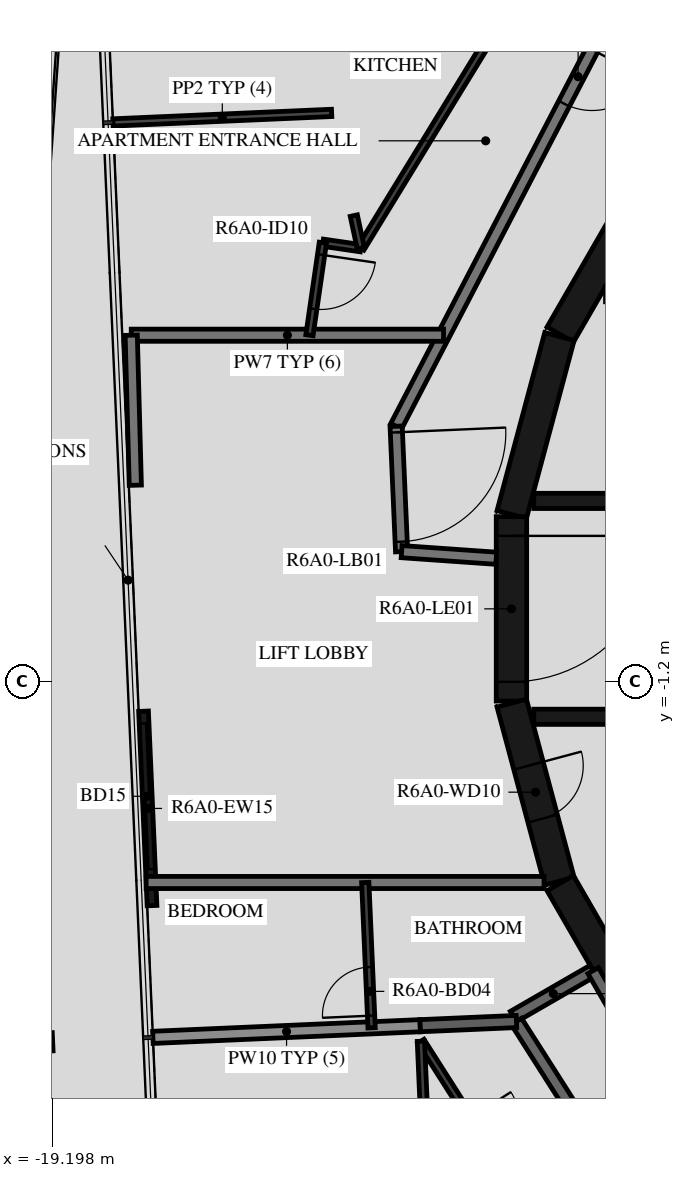
"""IFC4 building model, lengths in metres.
Left out: names, types, materials, properties, quantities, classifications, styles, units other than length and angle.
Written with IfcOpenShell. Run it as: python <this file> out.ifc"""

import sys

from ifc_helpers import new_model, si_unit, direction, frame, frame_2d, origin, origin_2d, place, context, subcontext, project, spatial, rectangle, i_section, extrude, element, fill, save


model = new_model("IFC4")
c1 = context("Model", 3, precision=1e-05, world=origin(), true_north=direction((0.0, 1.0)))
c2 = subcontext(c1, "Body", "Model", "MODEL_VIEW")
j1 = project(units=[si_unit("LENGTHUNIT", "METRE"), si_unit("PLANEANGLEUNIT", "RADIAN")], contexts=[c1])
p1 = place(None, origin())
s1 = spatial("IfcSite", under=j1, at=p1, CompositionType="ELEMENT")
p2 = place(p1, origin())
s2 = spatial("IfcBuilding", under=s1, at=p2, CompositionType="ELEMENT")
p3 = place(p2, frame((0.0, 0.0, 226.7)))
s3 = spatial("IfcBuildingStorey", under=s2, at=p3, CompositionType="ELEMENT", Elevation=226.7)
p4 = place(p3, frame((-19.642, -7.139, -0.45), z_axis=(0.0, 0.0, 1.0), x_axis=(-0.043619010384, 0.999048238041, 0.0)))
e1 = element("IfcColumn", 1, at=p4, inside=s3, PredefinedType="COLUMN", context=c2, shape_type="SweptSolid", body=[
    extrude(i_section(OverallWidth=0.3, OverallDepth=0.9, WebThickness=0.019, FlangeThickness=0.035, FilletRadius=0.03, at=origin_2d()), origin(), (0.0, 0.0, 1.0), 3.57),
])
p5 = place(p3, frame((-17.698, -1.684, 0.0), z_axis=(0.0, 0.0, 1.0), x_axis=(0.043639181999, -0.999047357133, 0.0)))
e2 = element("IfcWall", 2, at=p5, inside=s3, PredefinedType="STANDARD", context=c2, shape_type="SweptSolid", body=[
    extrude(rectangle(XDim=3.2, YDim=0.16, at=frame_2d((1.6, 0.0))), origin(), (0.0, 0.0, 1.0), 3.12),
])
p6 = place(p5, frame((0.2, 0.0, 0.0)))
e3 = element("IfcOpeningElement", 3, at=p6, cuts=e2, PredefinedType="OPENING", context=c2, shape_type="SweptSolid", body=[
    extrude(rectangle(XDim=2.4, YDim=2.4, at=frame_2d((1.2, 1.2))), frame((0.0, 0.09, 0.0), z_axis=(0.0, -1.0, 0.0), x_axis=(1.0, 0.0, 0.0)), (0.0, 0.0, 1.0), 0.18),
])
for number, where, z_axis, x_axis in (
    (4, (-9.329, 7.137, 0.0), (0.0, 0.0, 1.0), (-0.5, -0.866, 0.0)),
    (5, (-10.858, 4.479, 0.0), (0.0, 0.0, 1.0), (-0.259, -0.966, 0.0)),
):
    element("IfcWall", number, at=place(p3, frame(where, z_axis=z_axis, x_axis=x_axis)), inside=s3, PredefinedType="SHEAR", context=c2, shape_type="SweptSolid", body=[
        extrude(rectangle(XDim=3.033, YDim=0.5, at=frame_2d((1.516, 0.0))), origin(), (0.0, 0.0, 1.0), 3.12),
    ])
p7 = place(p3, frame((-11.647, 1.516, 0.0), z_axis=(0.0, 0.0, 1.0), x_axis=(0.0, -1.0, 0.0)))
e6 = element("IfcWall", 6, at=p7, inside=s3, PredefinedType="SHEAR", context=c2, shape_type="SweptSolid", body=[
    extrude(rectangle(XDim=3.033, YDim=0.5, at=frame_2d((1.516, 0.0))), origin(), (0.0, 0.0, 1.0), 3.12),
])
p8 = place(p7, frame((0.316, 0.0, 0.0)))
e7 = element("IfcOpeningElement", 7, at=p8, cuts=e6, PredefinedType="OPENING", context=c2, shape_type="SweptSolid", body=[
    extrude(rectangle(XDim=2.4, YDim=2.1, at=frame_2d((1.2, 1.05))), frame((0.0, 0.26, 0.0), z_axis=(0.0, -1.0, 0.0), x_axis=(1.0, 0.0, 0.0)), (0.0, 0.0, 1.0), 0.52),
])
p9 = place(p3, frame((-11.643, -1.55, 0.0), z_axis=(0.0, 0.0, 1.0), x_axis=(0.258734743916, -0.965948410781, 0.0)))
e8 = element("IfcWall", 8, at=p9, inside=s3, PredefinedType="SHEAR", context=c2, shape_type="SweptSolid", body=[
    extrude(rectangle(XDim=3.033, YDim=0.5, at=frame_2d((1.516, 0.0))), origin(), (0.0, 0.0, 1.0), 3.12),
])
p10 = place(p9, frame((1.066, 0.0, 0.0)))
e9 = element("IfcOpeningElement", 9, at=p10, cuts=e8, PredefinedType="OPENING", context=c2, shape_type="SweptSolid", body=[
    extrude(rectangle(XDim=0.9, YDim=2.1, at=frame_2d((0.45, 1.05))), frame((0.0, 0.26, 0.0), z_axis=(0.0, -1.0, 0.0), x_axis=(1.0, 0.0, 0.0)), (0.0, 0.0, 1.0), 0.52),
])
p11 = place(p3, frame((-10.845, -4.51, 0.0), z_axis=(0.0, 0.0, 1.0), x_axis=(0.500087131594, -0.865975092491, 0.0)))
e10 = element("IfcWall", 10, at=p11, inside=s3, PredefinedType="SHEAR", context=c2, shape_type="SweptSolid", body=[
    extrude(rectangle(XDim=3.033, YDim=0.5, at=frame_2d((1.516, 0.0))), origin(), (0.0, 0.0, 1.0), 3.12),
])
p12 = place(p3, frame((-11.28, 1.775, 0.0), z_axis=(0.0, 0.0, 1.0), x_axis=(1.0, 0.0, 0.0)))
e11 = element("IfcWall", 11, at=p12, inside=s3, PredefinedType="SHEAR", context=c2, shape_type="SweptSolid", body=[
    extrude(rectangle(XDim=14.38, YDim=0.25, at=frame_2d((7.19, 0.0))), origin(), (0.0, 0.0, 1.0), 3.12),
])
p13 = place(p12, frame((10.73, 0.0, 0.0)))
e12 = element("IfcOpeningElement", 12, at=p13, cuts=e11, PredefinedType="OPENING", context=c2, shape_type="SweptSolid", body=[
    extrude(rectangle(XDim=1.1, YDim=2.1, at=frame_2d((0.55, 1.05))), frame((0.0, 0.135, 0.0), z_axis=(0.0, -1.0, 0.0), x_axis=(1.0, 0.0, 0.0)), (0.0, 0.0, 1.0), 0.27),
])
p14 = place(p12, frame((12.88, 0.0, 0.0)))
e13 = element("IfcOpeningElement", 13, at=p14, cuts=e11, PredefinedType="OPENING", context=c2, shape_type="SweptSolid", body=[
    extrude(rectangle(XDim=1.1, YDim=2.1, at=frame_2d((0.55, 1.05))), frame((0.0, 0.135, 0.0), z_axis=(0.0, -1.0, 0.0), x_axis=(1.0, 0.0, 0.0)), (0.0, 0.0, 1.0), 0.27),
])
p15 = place(p12, frame((3.305, 0.0, 0.0)))
e14 = element("IfcOpeningElement", 14, at=p15, cuts=e11, PredefinedType="OPENING", context=c2, shape_type="SweptSolid", body=[
    extrude(rectangle(XDim=0.9, YDim=2.1, at=frame_2d((0.45, 1.05))), frame((0.0, 0.135, 0.0), z_axis=(0.0, -1.0, 0.0), x_axis=(1.0, 0.0, 0.0)), (0.0, 0.0, 1.0), 0.27),
])
p16 = place(p12, frame((7.605, 0.0, 0.0)))
e15 = element("IfcOpeningElement", 15, at=p16, cuts=e11, PredefinedType="OPENING", context=c2, shape_type="SweptSolid", body=[
    extrude(rectangle(XDim=0.9, YDim=2.1, at=frame_2d((0.45, 1.05))), frame((0.0, 0.135, 0.0), z_axis=(0.0, -1.0, 0.0), x_axis=(1.0, 0.0, 0.0)), (0.0, 0.0, 1.0), 0.27),
])
p17 = place(p3, frame((-11.28, -1.775, 0.0), z_axis=(0.0, 0.0, 1.0), x_axis=(1.0, 0.0, 0.0)))
e16 = element("IfcWall", 16, at=p17, inside=s3, PredefinedType="SHEAR", context=c2, shape_type="SweptSolid", body=[
    extrude(rectangle(XDim=14.38, YDim=0.25, at=frame_2d((7.19, 0.0))), origin(), (0.0, 0.0, 1.0), 3.12),
])
p18 = place(p17, frame((12.88, 0.0, 0.0)))
e17 = element("IfcOpeningElement", 17, at=p18, cuts=e16, PredefinedType="OPENING", context=c2, shape_type="SweptSolid", body=[
    extrude(rectangle(XDim=1.1, YDim=2.1, at=frame_2d((0.55, 1.05))), frame((0.0, 0.135, 0.0), z_axis=(0.0, -1.0, 0.0), x_axis=(1.0, 0.0, 0.0)), (0.0, 0.0, 1.0), 0.27),
])
p19 = place(p17, frame((7.605, 0.0, 0.0)))
e18 = element("IfcOpeningElement", 18, at=p19, cuts=e16, PredefinedType="OPENING", context=c2, shape_type="SweptSolid", body=[
    extrude(rectangle(XDim=0.9, YDim=2.1, at=frame_2d((0.45, 1.05))), frame((0.0, 0.135, 0.0), z_axis=(0.0, -1.0, 0.0), x_axis=(1.0, 0.0, 0.0)), (0.0, 0.0, 1.0), 0.27),
])
p20 = place(p17, frame((10.83, 0.0, 0.0)))
e19 = element("IfcOpeningElement", 19, at=p20, cuts=e16, PredefinedType="OPENING", context=c2, shape_type="SweptSolid", body=[
    extrude(rectangle(XDim=0.9, YDim=2.1, at=frame_2d((0.45, 1.05))), frame((0.0, 0.135, 0.0), z_axis=(0.0, -1.0, 0.0), x_axis=(1.0, 0.0, 0.0)), (0.0, 0.0, 1.0), 0.27),
])
p21 = place(p3, frame((-10.228, 9.372, 0.0), z_axis=(0.0, 0.0, 1.0), x_axis=(-0.461759464021, -0.887005184532, 0.0)))
e20 = element("IfcWall", 20, at=p21, inside=s3, PredefinedType="STANDARD", context=c2, shape_type="SweptSolid", body=[
    extrude(rectangle(XDim=7.181, YDim=0.2, at=frame_2d((3.591, 0.0))), origin(), (0.0, 0.0, 1.0), 3.12),
])
p22 = place(p21, frame((0.2, 0.0, 0.0)))
e21 = element("IfcOpeningElement", 21, at=p22, cuts=e20, PredefinedType="OPENING", context=c2, shape_type="SweptSolid", body=[
    extrude(rectangle(XDim=1.0, YDim=2.1, at=frame_2d((0.5, 1.05))), frame((0.0, 0.11, 0.0), z_axis=(0.0, -1.0, 0.0), x_axis=(1.0, 0.0, 0.0)), (0.0, 0.0, 1.0), 0.22),
])
p23 = place(p3, frame((-13.544, 3.003, 0.0), z_axis=(0.0, 0.0, 1.0), x_axis=(0.043652842459, -0.99904676034, 0.0)))
e22 = element("IfcWall", 22, at=p23, inside=s3, PredefinedType="STANDARD", context=c2, shape_type="SweptSolid", body=[
    extrude(rectangle(XDim=2.064, YDim=0.2, at=frame_2d((1.032, 0.0))), origin(), (0.0, 0.0, 1.0), 3.12),
])
p24 = place(p23, frame((0.1, 0.0, 0.0)))
e23 = element("IfcOpeningElement", 23, at=p24, cuts=e22, PredefinedType="OPENING", context=c2, shape_type="SweptSolid", body=[
    extrude(rectangle(XDim=1.8, YDim=2.1, at=frame_2d((0.9, 1.05))), frame((0.0, 0.11, 0.0), z_axis=(0.0, -1.0, 0.0), x_axis=(1.0, 0.0, 0.0)), (0.0, 0.0, 1.0), 0.22),
])
p25 = place(p3, frame((-13.454, 0.941, 0.0), z_axis=(0.0, 0.0, 1.0), x_axis=(0.99755155062, -0.069934997354, 0.0)))
e24 = element("IfcWall", 24, at=p25, inside=s3, PredefinedType="STANDARD", context=c2, shape_type="SweptSolid", body=[
    extrude(rectangle(XDim=1.561, YDim=0.2, at=frame_2d((0.78, 0.0))), origin(), (0.0, 0.0, 1.0), 3.12),
])
p26 = place(p3, frame((-10.303, -5.949, 0.0), z_axis=(0.0, 0.0, 1.0), x_axis=(-0.866043382451, -0.499968858743, 0.0)))
e25 = element("IfcWall", 25, at=p26, inside=s3, PredefinedType="STANDARD", context=c2, shape_type="SweptSolid", body=[
    extrude(rectangle(XDim=1.515, YDim=0.2, at=frame_2d((0.758, 0.0))), origin(), (0.0, 0.0, 1.0), 3.12),
])
p27 = place(p3, frame((-9.52, -7.305, 0.0), z_axis=(0.0, 0.0, 1.0), x_axis=(-0.500028278809, 0.866009076391, 0.0)))
e26 = element("IfcWall", 26, at=p27, inside=s3, PredefinedType="STANDARD", context=c2, shape_type="SweptSolid", body=[
    extrude(rectangle(XDim=1.566, YDim=0.2, at=frame_2d((0.783, 0.0))), origin(), (0.0, 0.0, 1.0), 3.12),
])
p28 = place(p3, frame((-11.565, -6.786, 0.0), z_axis=(0.0, 0.0, 1.0), x_axis=(0.537297327359, -0.843392898958, 0.0)))
e27 = element("IfcWall", 27, at=p28, inside=s3, PredefinedType="STANDARD", context=c2, shape_type="SweptSolid", body=[
    extrude(rectangle(XDim=4.081, YDim=0.2, at=frame_2d((2.041, 0.0))), origin(), (0.0, 0.0, 1.0), 3.12),
])
p29 = place(p3, frame((-12.764, 4.5, 0.0), z_axis=(0.0, 0.0, 1.0), x_axis=(-1.0, 0.0, 0.0)))
e28 = element("IfcWall", 28, at=p29, inside=s3, PredefinedType="STANDARD", context=c2, shape_type="SweptSolid", body=[
    extrude(rectangle(XDim=5.135, YDim=0.2, at=frame_2d((2.568, 0.0))), origin(), (0.0, 0.0, 1.0), 3.12),
])
p30 = place(p3, frame((-17.9, 4.5, 0.0), z_axis=(0.0, 0.0, 1.0), x_axis=(0.027204178319, -0.999629897853, 0.0)))
e29 = element("IfcWall", 29, at=p30, inside=s3, PredefinedType="STANDARD", context=c2, shape_type="SweptSolid", body=[
    extrude(rectangle(XDim=2.468, YDim=0.2, at=frame_2d((1.234, 0.0))), origin(), (0.0, 0.0, 1.0), 3.12),
])
p31 = place(p3, frame((-17.655, -4.5, 0.0), z_axis=(0.0, 0.0, 1.0), x_axis=(1.0, 0.0, 0.0)))
e30 = element("IfcWall", 30, at=p31, inside=s3, PredefinedType="STANDARD", context=c2, shape_type="SweptSolid", body=[
    extrude(rectangle(XDim=6.543, YDim=0.2, at=frame_2d((3.272, 0.0))), origin(), (0.0, 0.0, 1.0), 3.12),
])
p32 = place(p3, frame((-17.544, -7.047, 0.0), z_axis=(0.0, 0.0, 1.0), x_axis=(0.99904608111, 0.043668384662, 0.0)))
e31 = element("IfcWall", 31, at=p32, inside=s3, PredefinedType="STANDARD", context=c2, shape_type="SweptSolid", body=[
    extrude(rectangle(XDim=4.4, YDim=0.2, at=frame_2d((2.2, 0.0))), origin(), (0.0, 0.0, 1.0), 2.73),
])
p33 = place(p3, frame((-13.148, -6.855, 0.0), z_axis=(0.0, 0.0, 1.0), x_axis=(0.999048583464, 0.043611098121, 0.0)))
e32 = element("IfcWall", 32, at=p33, inside=s3, PredefinedType="STANDARD", context=c2, shape_type="SweptSolid", body=[
    extrude(rectangle(XDim=1.584, YDim=0.2, at=frame_2d((0.792, 0.0))), origin(), (0.0, 0.0, 1.0), 3.12),
])
p34 = place(p3, frame((-11.373, 10.421, 0.0), z_axis=(0.0, 0.0, 1.0), x_axis=(-0.522435957358, -0.852678527031, 0.0)))
e33 = element("IfcWall", 33, at=p34, inside=s3, PredefinedType="PARTITIONING", context=c2, shape_type="SweptSolid", body=[
    extrude(rectangle(XDim=5.267, YDim=0.12, at=frame_2d((2.633, 0.0))), origin(), (0.0, 0.0, 1.0), 3.12),
])
p35 = place(p3, frame((-14.125, 5.931, 0.0), z_axis=(0.0, 0.0, 1.0), x_axis=(-0.989621518838, 0.143698467119, 0.0)))
e34 = element("IfcWall", 34, at=p35, inside=s3, PredefinedType="PARTITIONING", context=c2, shape_type="SweptSolid", body=[
    extrude(rectangle(XDim=0.63, YDim=0.12, at=frame_2d((0.315, 0.0))), origin(), (0.0, 0.0, 1.0), 3.12),
])
p36 = place(p3, frame((-14.748, 6.021, 0.0), z_axis=(0.0, 0.0, 1.0), x_axis=(-0.143888945672, -0.98959384159, 0.0)))
e35 = element("IfcWall", 35, at=p36, inside=s3, PredefinedType="PARTITIONING", context=c2, shape_type="SweptSolid", body=[
    extrude(rectangle(XDim=1.537, YDim=0.12, at=frame_2d((0.769, 0.0))), origin(), (0.0, 0.0, 1.0), 3.12),
])
p37 = place(p36, frame((0.2, 0.0, 0.0)))
e36 = element("IfcOpeningElement", 36, at=p37, cuts=e35, PredefinedType="OPENING", context=c2, shape_type="SweptSolid", body=[
    extrude(rectangle(XDim=0.9, YDim=2.1, at=frame_2d((0.45, 1.05))), frame((0.0, 0.07, 0.0), z_axis=(0.0, -1.0, 0.0), x_axis=(1.0, 0.0, 0.0)), (0.0, 0.0, 1.0), 0.14),
])
p38 = place(p3, frame((-14.24, 6.467, 0.0), z_axis=(0.0, 0.0, 1.0), x_axis=(0.210896225868, -0.977508456186, 0.0)))
e37 = element("IfcWall", 37, at=p38, inside=s3, PredefinedType="PARTITIONING", context=c2, shape_type="SweptSolid", body=[
    extrude(rectangle(XDim=0.549, YDim=0.12, at=frame_2d((0.274, 0.0))), origin(), (0.0, 0.0, 1.0), 3.12),
])
p39 = place(p3, frame((-18.201, 7.999, 0.0), z_axis=(0.0, 0.0, 1.0), x_axis=(0.999048850974, 0.043604969534, 0.0)))
e38 = element("IfcWall", 38, at=p39, inside=s3, PredefinedType="PARTITIONING", context=c2, shape_type="SweptSolid", body=[
    extrude(rectangle(XDim=3.6, YDim=0.12, at=frame_2d((1.8, 0.0))), origin(), (0.0, 0.0, 1.0), 2.73),
])
p40 = place(p3, frame((-13.947, -6.89, 0.0), z_axis=(0.0, 0.0, 1.0), x_axis=(-0.043680814195, 0.999045537737, 0.0)))
e39 = element("IfcWall", 39, at=p40, inside=s3, PredefinedType="PARTITIONING", context=c2, shape_type="SweptSolid", body=[
    extrude(rectangle(XDim=2.392, YDim=0.12, at=frame_2d((1.196, 0.0))), origin(), (0.0, 0.0, 1.0), 3.12),
])
p41 = place(p40, frame((0.2, 0.0, 0.0)))
e40 = element("IfcOpeningElement", 40, at=p41, cuts=e39, PredefinedType="OPENING", context=c2, shape_type="SweptSolid", body=[
    extrude(rectangle(XDim=0.8, YDim=2.1, at=frame_2d((0.4, 1.05))), frame((0.0, 0.07, 0.0), z_axis=(0.0, -1.0, 0.0), x_axis=(1.0, 0.0, 0.0)), (0.0, 0.0, 1.0), 0.14),
])
p42 = place(p3, frame((-13.137, -7.111, 0.0), z_axis=(0.0, 0.0, 1.0), x_axis=(0.537300549444, -0.843390846267, 0.0)))
e41 = element("IfcWall", 41, at=p42, inside=s3, PredefinedType="PARTITIONING", context=c2, shape_type="SweptSolid", body=[
    extrude(rectangle(XDim=5.054, YDim=0.12, at=frame_2d((2.527, 0.0))), origin(), (0.0, 0.0, 1.0), 3.12),
])
p43 = place(p42, frame((1.5, 0.0, 0.0)))
e42 = element("IfcOpeningElement", 42, at=p43, cuts=e41, PredefinedType="OPENING", context=c2, shape_type="SweptSolid", body=[
    extrude(rectangle(XDim=0.8, YDim=2.1, at=frame_2d((0.4, 1.05))), frame((0.0, 0.07, 0.0), z_axis=(0.0, -1.0, 0.0), x_axis=(1.0, 0.0, 0.0)), (0.0, 0.0, 1.0), 0.14),
])
p44 = place(p3, frame((-12.936, -11.703, 0.0), z_axis=(0.0, 0.0, 1.0), x_axis=(-0.043610108597, 0.999048626658, 0.0)))
e43 = element("IfcWall", 43, at=p44, inside=s3, PredefinedType="PARTITIONING", context=c2, shape_type="SweptSolid", body=[
    extrude(rectangle(XDim=4.596, YDim=0.12, at=frame_2d((2.298, 0.0))), origin(), (0.0, 0.0, 1.0), 3.12),
])
p45 = place(p6, origin())
e44 = element("IfcDoor", 44, at=p45, inside=s3, OperationType="DOUBLE_DOOR_SLIDING", PredefinedType="DOOR", context=c2, shape_type="SweptSolid", body=[
    extrude(rectangle(XDim=2.4, YDim=2.4, at=frame_2d((1.2, 1.2))), frame((0.0, 0.025, 0.0), z_axis=(0.0, -1.0, 0.0), x_axis=(1.0, 0.0, 0.0)), (0.0, 0.0, 1.0), 0.05),
])
fill(e3, e44)
p46 = place(p8, origin())
e45 = element("IfcDoor", 45, at=p46, inside=s3, OperationType="DOUBLE_DOOR_SINGLE_SWING", PredefinedType="DOOR", context=c2, shape_type="SweptSolid", body=[
    extrude(rectangle(XDim=2.4, YDim=2.1, at=frame_2d((1.2, 1.05))), frame((0.0, 0.025, 0.0), z_axis=(0.0, -1.0, 0.0), x_axis=(1.0, 0.0, 0.0)), (0.0, 0.0, 1.0), 0.05),
])
fill(e7, e45)
p47 = place(p10, origin())
e46 = element("IfcDoor", 46, at=p47, inside=s3, OperationType="SINGLE_SWING_RIGHT", PredefinedType="DOOR", context=c2, shape_type="SweptSolid", body=[
    extrude(rectangle(XDim=0.9, YDim=2.1, at=frame_2d((0.45, 1.05))), frame((0.0, 0.025, 0.0), z_axis=(0.0, -1.0, 0.0), x_axis=(1.0, 0.0, 0.0)), (0.0, 0.0, 1.0), 0.05),
])
fill(e9, e46)
p48 = place(p22, origin())
e47 = element("IfcDoor", 47, at=p48, inside=s3, OperationType="SINGLE_SWING_LEFT", PredefinedType="DOOR", context=c2, shape_type="SweptSolid", body=[
    extrude(rectangle(XDim=1.0, YDim=2.1, at=frame_2d((0.5, 1.05))), frame((0.0, 0.025, 0.0), z_axis=(0.0, -1.0, 0.0), x_axis=(1.0, 0.0, 0.0)), (0.0, 0.0, 1.0), 0.05),
])
fill(e21, e47)
p49 = place(p37, origin())
e48 = element("IfcDoor", 48, at=p49, inside=s3, OperationType="SINGLE_SWING_LEFT", PredefinedType="DOOR", context=c2, shape_type="SweptSolid", body=[
    extrude(rectangle(XDim=0.9, YDim=2.1, at=frame_2d((0.45, 1.05))), frame((0.0, 0.025, 0.0), z_axis=(0.0, -1.0, 0.0), x_axis=(1.0, 0.0, 0.0)), (0.0, 0.0, 1.0), 0.05),
])
fill(e36, e48)
p50 = place(p41, origin())
e49 = element("IfcDoor", 49, at=p50, inside=s3, OperationType="SINGLE_SWING_LEFT", PredefinedType="DOOR", context=c2, shape_type="SweptSolid", body=[
    extrude(rectangle(XDim=0.8, YDim=2.1, at=frame_2d((0.4, 1.05))), frame((0.0, 0.025, 0.0), z_axis=(0.0, -1.0, 0.0), x_axis=(1.0, 0.0, 0.0)), (0.0, 0.0, 1.0), 0.05),
])
fill(e40, e49)
p51 = place(p24, origin())
e50 = element("IfcDoor", 50, at=p51, inside=s3, OperationType="DOUBLE_DOOR_SINGLE_SWING", PredefinedType="DOOR", context=c2, shape_type="SweptSolid", body=[
    extrude(rectangle(XDim=1.8, YDim=2.1, at=frame_2d((0.9, 1.05))), frame((0.0, 0.025, 0.0), z_axis=(0.0, -1.0, 0.0), x_axis=(1.0, 0.0, 0.0)), (0.0, 0.0, 1.0), 0.05),
])
fill(e23, e50)
save(model, sys.argv[1])
